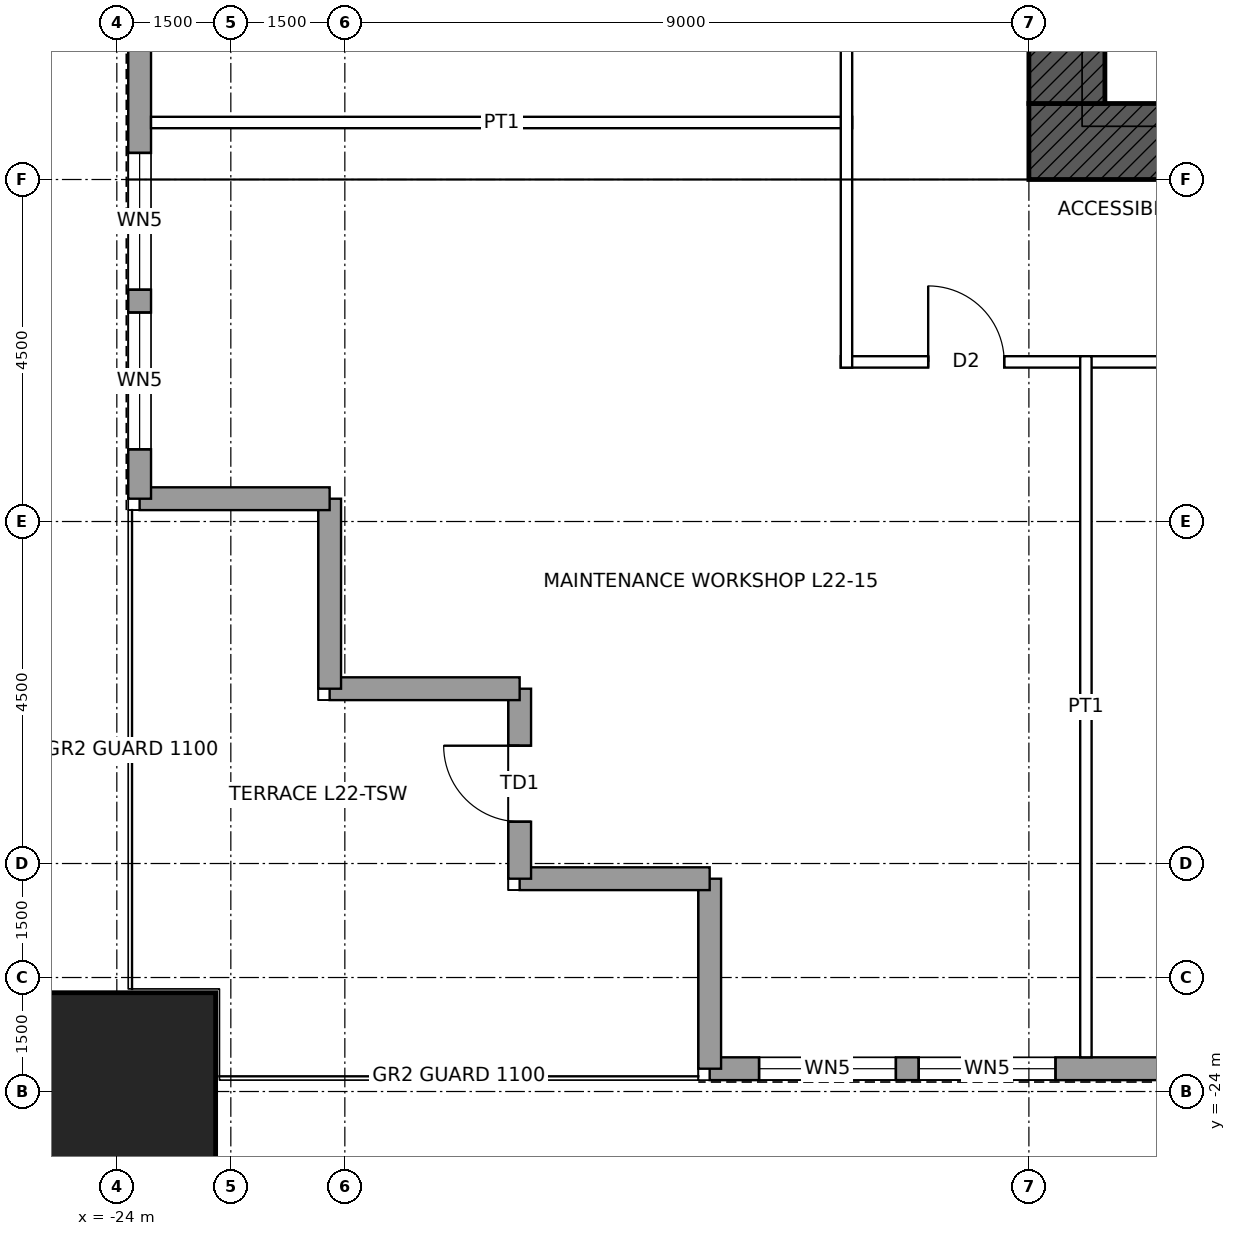
"""IFC4 building model, lengths in metres.
Left out: names, types, materials, properties, quantities, classifications, styles, units other than length and angle.
Written with IfcOpenShell. Run it as: python <this file> out.ifc"""

import sys

from ifc_helpers import new_model, si_unit, direction, frame, frame_2d, origin, origin_2d, place, context, subcontext, project, spatial, rectangle, hollow_rectangle, extrude, element, fill, save


model = new_model("IFC4")
c1 = context("Model", 3, precision=1e-05, world=origin(), true_north=direction((0.0, 1.0)))
c2 = subcontext(c1, "Body", "Model", "MODEL_VIEW")
j1 = project(units=[si_unit("LENGTHUNIT", "METRE"), si_unit("PLANEANGLEUNIT", "RADIAN")], contexts=[c1])
p1 = place(None, origin())
s1 = spatial("IfcSite", under=j1, at=p1, CompositionType="ELEMENT")
p2 = place(p1, origin())
s2 = spatial("IfcBuilding", under=s1, at=p2, CompositionType="ELEMENT")
p3 = place(p2, frame((0.0, 0.0, 113.4)))
s3 = spatial("IfcBuildingStorey", under=s2, at=p3, CompositionType="ELEMENT", Elevation=113.4)
p4 = place(p3, frame((-24.0, -24.0, 0.0), z_axis=(0.0, 0.0, 1.0), x_axis=(1.0, 0.0, 0.0)))
e1 = element("IfcColumn", 1, at=p4, inside=s3, PredefinedType="COLUMN", context=c2, shape_type="SweptSolid", body=[
    extrude(hollow_rectangle(XDim=2.6, YDim=2.6, WallThickness=0.13, at=origin_2d()), origin(), (0.0, 0.0, 1.0), 4.5),
])
p5 = place(p3, frame((12.0, -11.5, 0.0), z_axis=(0.0, 0.0, 1.0), x_axis=(-1.0, 0.0, 0.0)))
e2 = element("IfcWall", 2, at=p5, inside=s3, PredefinedType="SHEAR", context=c2, shape_type="SweptSolid", body=[
    extrude(rectangle(XDim=24.0, YDim=1.0, at=frame_2d((12.0, 0.0))), origin(), (0.0, 0.0, 1.0), 4.5),
])
p6 = place(p5, frame((11.5, 0.0, 0.0)))
e3 = element("IfcOpeningElement", 3, at=p6, cuts=e2, PredefinedType="OPENING", context=c2, shape_type="SweptSolid", body=[
    extrude(rectangle(XDim=1.0, YDim=2.1, at=frame_2d((0.5, 1.05))), frame((0.0, 0.51, 0.0), z_axis=(0.0, -1.0, 0.0), x_axis=(1.0, 0.0, 0.0)), (0.0, 0.0, 1.0), 1.02),
])
p7 = place(p5, frame((1.0, 0.0, 0.0)))
e4 = element("IfcOpeningElement", 4, at=p7, cuts=e2, PredefinedType="OPENING", context=c2, shape_type="SweptSolid", body=[
    extrude(rectangle(XDim=1.0, YDim=2.4, at=frame_2d((0.5, 1.2))), frame((0.0, 0.51, 0.0), z_axis=(0.0, -1.0, 0.0), x_axis=(1.0, 0.0, 0.0)), (0.0, 0.0, 1.0), 1.02),
])
p8 = place(p3, frame((-11.5, -11.0, 0.0), z_axis=(0.0, 0.0, 1.0), x_axis=(0.0, 1.0, 0.0)))
e5 = element("IfcWall", 5, at=p8, inside=s3, PredefinedType="SHEAR", context=c2, shape_type="SweptSolid", body=[
    extrude(rectangle(XDim=22.0, YDim=1.0, at=frame_2d((11.0, 0.0))), origin(), (0.0, 0.0, 1.0), 4.5),
])
p9 = place(p8, frame((10.5, 0.0, 0.0)))
e6 = element("IfcOpeningElement", 6, at=p9, cuts=e5, PredefinedType="OPENING", context=c2, shape_type="SweptSolid", body=[
    extrude(rectangle(XDim=1.0, YDim=2.4, at=frame_2d((0.5, 1.2))), frame((0.0, 0.51, 0.0), z_axis=(0.0, -1.0, 0.0), x_axis=(1.0, 0.0, 0.0)), (0.0, 0.0, 1.0), 1.02),
])
p10 = place(p3, frame((16.2, -23.7, 0.0), z_axis=(0.0, 0.0, 1.0), x_axis=(-1.0, 0.0, 0.0)))
e7 = element("IfcWall", 7, at=p10, inside=s3, PredefinedType="SOLIDWALL", context=c2, shape_type="SweptSolid", body=[
    extrude(rectangle(XDim=32.4, YDim=0.3, at=frame_2d((16.2, 0.0))), origin(), (0.0, 0.0, 1.0), 4.3),
])
p11 = place(p10, frame((0.65, 0.0, 1.0)))
e8 = element("IfcOpeningElement", 8, at=p11, cuts=e7, PredefinedType="OPENING", context=c2, shape_type="SweptSolid", body=[
    extrude(rectangle(XDim=1.8, YDim=1.2, at=frame_2d((0.9, 0.6))), frame((0.0, 0.16, 0.0), z_axis=(0.0, -1.0, 0.0), x_axis=(1.0, 0.0, 0.0)), (0.0, 0.0, 1.0), 0.32),
])
p12 = place(p10, frame((2.75, 0.0, 1.0)))
e9 = element("IfcOpeningElement", 9, at=p12, cuts=e7, PredefinedType="OPENING", context=c2, shape_type="SweptSolid", body=[
    extrude(rectangle(XDim=1.8, YDim=1.2, at=frame_2d((0.9, 0.6))), frame((0.0, 0.16, 0.0), z_axis=(0.0, -1.0, 0.0), x_axis=(1.0, 0.0, 0.0)), (0.0, 0.0, 1.0), 0.32),
])
p13 = place(p10, frame((9.5, 0.0, 1.0)))
e10 = element("IfcOpeningElement", 10, at=p13, cuts=e7, PredefinedType="OPENING", context=c2, shape_type="SweptSolid", body=[
    extrude(rectangle(XDim=2.4, YDim=1.2, at=frame_2d((1.2, 0.6))), frame((0.0, 0.16, 0.0), z_axis=(0.0, -1.0, 0.0), x_axis=(1.0, 0.0, 0.0)), (0.0, 0.0, 1.0), 0.32),
])
p14 = place(p10, frame((13.0, 0.0, 1.0)))
e11 = element("IfcOpeningElement", 11, at=p14, cuts=e7, PredefinedType="OPENING", context=c2, shape_type="SweptSolid", body=[
    extrude(rectangle(XDim=2.4, YDim=1.2, at=frame_2d((1.2, 0.6))), frame((0.0, 0.16, 0.0), z_axis=(0.0, -1.0, 0.0), x_axis=(1.0, 0.0, 0.0)), (0.0, 0.0, 1.0), 0.32),
])
p15 = place(p10, frame((17.0, 0.0, 1.0)))
e12 = element("IfcOpeningElement", 12, at=p15, cuts=e7, PredefinedType="OPENING", context=c2, shape_type="SweptSolid", body=[
    extrude(rectangle(XDim=2.4, YDim=1.2, at=frame_2d((1.2, 0.6))), frame((0.0, 0.16, 0.0), z_axis=(0.0, -1.0, 0.0), x_axis=(1.0, 0.0, 0.0)), (0.0, 0.0, 1.0), 0.32),
])
p16 = place(p10, frame((20.5, 0.0, 1.0)))
e13 = element("IfcOpeningElement", 13, at=p16, cuts=e7, PredefinedType="OPENING", context=c2, shape_type="SweptSolid", body=[
    extrude(rectangle(XDim=2.4, YDim=1.2, at=frame_2d((1.2, 0.6))), frame((0.0, 0.16, 0.0), z_axis=(0.0, -1.0, 0.0), x_axis=(1.0, 0.0, 0.0)), (0.0, 0.0, 1.0), 0.32),
])
p17 = place(p10, frame((27.85, 0.0, 1.0)))
e14 = element("IfcOpeningElement", 14, at=p17, cuts=e7, PredefinedType="OPENING", context=c2, shape_type="SweptSolid", body=[
    extrude(rectangle(XDim=1.8, YDim=1.2, at=frame_2d((0.9, 0.6))), frame((0.0, 0.16, 0.0), z_axis=(0.0, -1.0, 0.0), x_axis=(1.0, 0.0, 0.0)), (0.0, 0.0, 1.0), 0.32),
])
p18 = place(p10, frame((29.95, 0.0, 1.0)))
e15 = element("IfcOpeningElement", 15, at=p18, cuts=e7, PredefinedType="OPENING", context=c2, shape_type="SweptSolid", body=[
    extrude(rectangle(XDim=1.8, YDim=1.2, at=frame_2d((0.9, 0.6))), frame((0.0, 0.16, 0.0), z_axis=(0.0, -1.0, 0.0), x_axis=(1.0, 0.0, 0.0)), (0.0, 0.0, 1.0), 0.32),
])
for number, where, z_axis, x_axis in (
    (16, (-16.2, -23.7, 0.0), (0.0, 0.0, 1.0), (0.0, 1.0, 0.0)),
    (17, (-16.2, -21.2, 0.0), (0.0, 0.0, 1.0), (-1.0, 0.0, 0.0)),
):
    element("IfcWall", number, at=place(p3, frame(where, z_axis=z_axis, x_axis=x_axis)), inside=s3, PredefinedType="SOLIDWALL", context=c2, shape_type="SweptSolid", body=[
        extrude(rectangle(XDim=2.5, YDim=0.3, at=frame_2d((1.25, 0.0))), origin(), (0.0, 0.0, 1.0), 4.3),
    ])
p19 = place(p3, frame((-18.7, -21.2, 0.0), z_axis=(0.0, 0.0, 1.0), x_axis=(0.0, 1.0, 0.0)))
e18 = element("IfcWall", 18, at=p19, inside=s3, PredefinedType="SOLIDWALL", context=c2, shape_type="SweptSolid", body=[
    extrude(rectangle(XDim=2.5, YDim=0.3, at=frame_2d((1.25, 0.0))), origin(), (0.0, 0.0, 1.0), 4.3),
])
p20 = place(p19, frame((0.75, 0.0, 0.0)))
e19 = element("IfcOpeningElement", 19, at=p20, cuts=e18, PredefinedType="OPENING", context=c2, shape_type="SweptSolid", body=[
    extrude(rectangle(XDim=1.0, YDim=2.4, at=frame_2d((0.5, 1.2))), frame((0.0, 0.16, 0.0), z_axis=(0.0, -1.0, 0.0), x_axis=(1.0, 0.0, 0.0)), (0.0, 0.0, 1.0), 0.32),
])
for number, where, z_axis, x_axis in (
    (20, (-18.7, -18.7, 0.0), (0.0, 0.0, 1.0), (-1.0, 0.0, 0.0)),
    (21, (-21.2, -18.7, 0.0), (0.0, 0.0, 1.0), (0.0, 1.0, 0.0)),
    (22, (-21.2, -16.2, 0.0), (0.0, 0.0, 1.0), (-1.0, 0.0, 0.0)),
):
    element("IfcWall", number, at=place(p3, frame(where, z_axis=z_axis, x_axis=x_axis)), inside=s3, PredefinedType="SOLIDWALL", context=c2, shape_type="SweptSolid", body=[
        extrude(rectangle(XDim=2.5, YDim=0.3, at=frame_2d((1.25, 0.0))), origin(), (0.0, 0.0, 1.0), 4.3),
    ])
p21 = place(p3, frame((-23.7, -16.2, 0.0), z_axis=(0.0, 0.0, 1.0), x_axis=(0.0, 1.0, 0.0)))
e23 = element("IfcWall", 23, at=p21, inside=s3, PredefinedType="SOLIDWALL", context=c2, shape_type="SweptSolid", body=[
    extrude(rectangle(XDim=32.4, YDim=0.3, at=frame_2d((16.2, 0.0))), origin(), (0.0, 0.0, 1.0), 4.3),
])
p22 = place(p21, frame((0.65, 0.0, 1.0)))
e24 = element("IfcOpeningElement", 24, at=p22, cuts=e23, PredefinedType="OPENING", context=c2, shape_type="SweptSolid", body=[
    extrude(rectangle(XDim=1.8, YDim=1.2, at=frame_2d((0.9, 0.6))), frame((0.0, 0.16, 0.0), z_axis=(0.0, -1.0, 0.0), x_axis=(1.0, 0.0, 0.0)), (0.0, 0.0, 1.0), 0.32),
])
p23 = place(p21, frame((2.75, 0.0, 1.0)))
e25 = element("IfcOpeningElement", 25, at=p23, cuts=e23, PredefinedType="OPENING", context=c2, shape_type="SweptSolid", body=[
    extrude(rectangle(XDim=1.8, YDim=1.2, at=frame_2d((0.9, 0.6))), frame((0.0, 0.16, 0.0), z_axis=(0.0, -1.0, 0.0), x_axis=(1.0, 0.0, 0.0)), (0.0, 0.0, 1.0), 0.32),
])
p24 = place(p21, frame((9.5, 0.0, 1.0)))
e26 = element("IfcOpeningElement", 26, at=p24, cuts=e23, PredefinedType="OPENING", context=c2, shape_type="SweptSolid", body=[
    extrude(rectangle(XDim=2.4, YDim=1.2, at=frame_2d((1.2, 0.6))), frame((0.0, 0.16, 0.0), z_axis=(0.0, -1.0, 0.0), x_axis=(1.0, 0.0, 0.0)), (0.0, 0.0, 1.0), 0.32),
])
p25 = place(p21, frame((13.0, 0.0, 1.0)))
e27 = element("IfcOpeningElement", 27, at=p25, cuts=e23, PredefinedType="OPENING", context=c2, shape_type="SweptSolid", body=[
    extrude(rectangle(XDim=2.4, YDim=1.2, at=frame_2d((1.2, 0.6))), frame((0.0, 0.16, 0.0), z_axis=(0.0, -1.0, 0.0), x_axis=(1.0, 0.0, 0.0)), (0.0, 0.0, 1.0), 0.32),
])
p26 = place(p21, frame((16.6, 0.0, 1.0)))
e28 = element("IfcOpeningElement", 28, at=p26, cuts=e23, PredefinedType="OPENING", context=c2, shape_type="SweptSolid", body=[
    extrude(rectangle(XDim=2.4, YDim=1.2, at=frame_2d((1.2, 0.6))), frame((0.0, 0.16, 0.0), z_axis=(0.0, -1.0, 0.0), x_axis=(1.0, 0.0, 0.0)), (0.0, 0.0, 1.0), 0.32),
])
p27 = place(p21, frame((19.3, 0.0, 1.0)))
e29 = element("IfcOpeningElement", 29, at=p27, cuts=e23, PredefinedType="OPENING", context=c2, shape_type="SweptSolid", body=[
    extrude(rectangle(XDim=2.4, YDim=1.2, at=frame_2d((1.2, 0.6))), frame((0.0, 0.16, 0.0), z_axis=(0.0, -1.0, 0.0), x_axis=(1.0, 0.0, 0.0)), (0.0, 0.0, 1.0), 0.32),
])
p28 = place(p21, frame((22.0, 0.0, 1.0)))
e30 = element("IfcOpeningElement", 30, at=p28, cuts=e23, PredefinedType="OPENING", context=c2, shape_type="SweptSolid", body=[
    extrude(rectangle(XDim=1.8, YDim=1.2, at=frame_2d((0.9, 0.6))), frame((0.0, 0.16, 0.0), z_axis=(0.0, -1.0, 0.0), x_axis=(1.0, 0.0, 0.0)), (0.0, 0.0, 1.0), 0.32),
])
p29 = place(p21, frame((28.0, 0.0, 1.0)))
e31 = element("IfcOpeningElement", 31, at=p29, cuts=e23, PredefinedType="OPENING", context=c2, shape_type="SweptSolid", body=[
    extrude(rectangle(XDim=2.4, YDim=1.2, at=frame_2d((1.2, 0.6))), frame((0.0, 0.16, 0.0), z_axis=(0.0, -1.0, 0.0), x_axis=(1.0, 0.0, 0.0)), (0.0, 0.0, 1.0), 0.32),
])
p30 = place(p3, frame((-14.475, -14.4, 0.0), z_axis=(0.0, 0.0, 1.0), x_axis=(1.0, 0.0, 0.0)))
e32 = element("IfcWall", 32, at=p30, inside=s3, PredefinedType="PARTITIONING", context=c2, shape_type="SweptSolid", body=[
    extrude(rectangle(XDim=28.95, YDim=0.15, at=frame_2d((14.475, 0.0))), origin(), (0.0, 0.0, 1.0), 4.3),
])
p31 = place(p30, frame((21.075, 0.0, 0.0)))
e33 = element("IfcOpeningElement", 33, at=p31, cuts=e32, PredefinedType="OPENING", context=c2, shape_type="SweptSolid", body=[
    extrude(rectangle(XDim=1.8, YDim=2.4, at=frame_2d((0.9, 1.2))), frame((0.0, 0.085, 0.0), z_axis=(0.0, -1.0, 0.0), x_axis=(1.0, 0.0, 0.0)), (0.0, 0.0, 1.0), 0.17),
])
p32 = place(p30, frame((13.575, 0.0, 0.0)))
e34 = element("IfcOpeningElement", 34, at=p32, cuts=e32, PredefinedType="OPENING", context=c2, shape_type="SweptSolid", body=[
    extrude(rectangle(XDim=1.8, YDim=2.4, at=frame_2d((0.9, 1.2))), frame((0.0, 0.085, 0.0), z_axis=(0.0, -1.0, 0.0), x_axis=(1.0, 0.0, 0.0)), (0.0, 0.0, 1.0), 0.17),
])
p33 = place(p30, frame((6.475, 0.0, 0.0)))
e35 = element("IfcOpeningElement", 35, at=p33, cuts=e32, PredefinedType="OPENING", context=c2, shape_type="SweptSolid", body=[
    extrude(rectangle(XDim=1.0, YDim=2.1, at=frame_2d((0.5, 1.05))), frame((0.0, 0.085, 0.0), z_axis=(0.0, -1.0, 0.0), x_axis=(1.0, 0.0, 0.0)), (0.0, 0.0, 1.0), 0.17),
])
p34 = place(p30, frame((26.8, 0.0, 0.0)))
e36 = element("IfcOpeningElement", 36, at=p34, cuts=e32, PredefinedType="OPENING", context=c2, shape_type="SweptSolid", body=[
    extrude(rectangle(XDim=1.0, YDim=2.1, at=frame_2d((0.5, 1.05))), frame((0.0, 0.085, 0.0), z_axis=(0.0, -1.0, 0.0), x_axis=(1.0, 0.0, 0.0)), (0.0, 0.0, 1.0), 0.17),
])
p35 = place(p30, frame((1.15, 0.0, 0.0)))
e37 = element("IfcOpeningElement", 37, at=p35, cuts=e32, PredefinedType="OPENING", context=c2, shape_type="SweptSolid", body=[
    extrude(rectangle(XDim=1.0, YDim=2.1, at=frame_2d((0.5, 1.05))), frame((0.0, 0.085, 0.0), z_axis=(0.0, -1.0, 0.0), x_axis=(1.0, 0.0, 0.0)), (0.0, 0.0, 1.0), 0.17),
])
p36 = place(p3, frame((-23.55, -11.25, 0.0), z_axis=(0.0, 0.0, 1.0), x_axis=(1.0, 0.0, 0.0)))
e38 = element("IfcWall", 38, at=p36, inside=s3, PredefinedType="PARTITIONING", context=c2, shape_type="SweptSolid", body=[
    extrude(rectangle(XDim=9.225, YDim=0.15, at=frame_2d((4.613, 0.0))), origin(), (0.0, 0.0, 1.0), 3.431),
])
p37 = place(p3, frame((-14.4, -14.475, 0.0), z_axis=(0.0, 0.0, 1.0), x_axis=(0.0, 1.0, 0.0)))
e39 = element("IfcWall", 39, at=p37, inside=s3, PredefinedType="PARTITIONING", context=c2, shape_type="SweptSolid", body=[
    extrude(rectangle(XDim=28.95, YDim=0.15, at=frame_2d((14.475, 0.0))), origin(), (0.0, 0.0, 1.0), 4.3),
])
p38 = place(p37, frame((6.075, 0.0, 0.0)))
e40 = element("IfcOpeningElement", 40, at=p38, cuts=e39, PredefinedType="OPENING", context=c2, shape_type="SweptSolid", body=[
    extrude(rectangle(XDim=1.8, YDim=2.4, at=frame_2d((0.9, 1.2))), frame((0.0, 0.085, 0.0), z_axis=(0.0, -1.0, 0.0), x_axis=(1.0, 0.0, 0.0)), (0.0, 0.0, 1.0), 0.17),
])
p39 = place(p37, frame((17.325, 0.0, 0.0)))
e41 = element("IfcOpeningElement", 41, at=p39, cuts=e39, PredefinedType="OPENING", context=c2, shape_type="SweptSolid", body=[
    extrude(rectangle(XDim=1.8, YDim=2.4, at=frame_2d((0.9, 1.2))), frame((0.0, 0.085, 0.0), z_axis=(0.0, -1.0, 0.0), x_axis=(1.0, 0.0, 0.0)), (0.0, 0.0, 1.0), 0.17),
])
p40 = place(p3, frame((-11.25, -23.55, 0.0), z_axis=(0.0, 0.0, 1.0), x_axis=(0.0, 1.0, 0.0)))
e42 = element("IfcWall", 42, at=p40, inside=s3, PredefinedType="PARTITIONING", context=c2, shape_type="SweptSolid", body=[
    extrude(rectangle(XDim=9.225, YDim=0.15, at=frame_2d((4.613, 0.0))), origin(), (0.0, 0.0, 1.0), 3.431),
])
p41 = place(p17, origin())
e43 = element("IfcWindow", 43, at=p41, inside=s3, PartitioningType="SINGLE_PANEL", PredefinedType="WINDOW", context=c2, shape_type="SweptSolid", body=[
    extrude(rectangle(XDim=1.8, YDim=1.2, at=frame_2d((0.9, 0.6))), frame((0.0, 0.03, 0.0), z_axis=(0.0, -1.0, 0.0), x_axis=(1.0, 0.0, 0.0)), (0.0, 0.0, 1.0), 0.06),
])
fill(e14, e43)
p42 = place(p18, origin())
e44 = element("IfcWindow", 44, at=p42, inside=s3, PartitioningType="SINGLE_PANEL", PredefinedType="WINDOW", context=c2, shape_type="SweptSolid", body=[
    extrude(rectangle(XDim=1.8, YDim=1.2, at=frame_2d((0.9, 0.6))), frame((0.0, 0.03, 0.0), z_axis=(0.0, -1.0, 0.0), x_axis=(1.0, 0.0, 0.0)), (0.0, 0.0, 1.0), 0.06),
])
fill(e15, e44)
p43 = place(p20, origin())
e45 = element("IfcDoor", 45, at=p43, inside=s3, OperationType="SINGLE_SWING_RIGHT", PredefinedType="DOOR", context=c2, shape_type="SweptSolid", body=[
    extrude(rectangle(XDim=1.0, YDim=2.4, at=frame_2d((0.5, 1.2))), frame((0.0, 0.025, 0.0), z_axis=(0.0, -1.0, 0.0), x_axis=(1.0, 0.0, 0.0)), (0.0, 0.0, 1.0), 0.05),
])
fill(e19, e45)
p44 = place(p22, origin())
e46 = element("IfcWindow", 46, at=p44, inside=s3, PartitioningType="SINGLE_PANEL", PredefinedType="WINDOW", context=c2, shape_type="SweptSolid", body=[
    extrude(rectangle(XDim=1.8, YDim=1.2, at=frame_2d((0.9, 0.6))), frame((0.0, 0.03, 0.0), z_axis=(0.0, -1.0, 0.0), x_axis=(1.0, 0.0, 0.0)), (0.0, 0.0, 1.0), 0.06),
])
fill(e24, e46)
p45 = place(p23, origin())
e47 = element("IfcWindow", 47, at=p45, inside=s3, PartitioningType="SINGLE_PANEL", PredefinedType="WINDOW", context=c2, shape_type="SweptSolid", body=[
    extrude(rectangle(XDim=1.8, YDim=1.2, at=frame_2d((0.9, 0.6))), frame((0.0, 0.03, 0.0), z_axis=(0.0, -1.0, 0.0), x_axis=(1.0, 0.0, 0.0)), (0.0, 0.0, 1.0), 0.06),
])
fill(e25, e47)
p46 = place(p35, origin())
e48 = element("IfcDoor", 48, at=p46, inside=s3, OperationType="SINGLE_SWING_LEFT", PredefinedType="DOOR", context=c2, shape_type="SweptSolid", body=[
    extrude(rectangle(XDim=1.0, YDim=2.1, at=frame_2d((0.5, 1.05))), frame((0.0, 0.025, 0.0), z_axis=(0.0, -1.0, 0.0), x_axis=(1.0, 0.0, 0.0)), (0.0, 0.0, 1.0), 0.05),
])
fill(e37, e48)
save(model, sys.argv[1])
